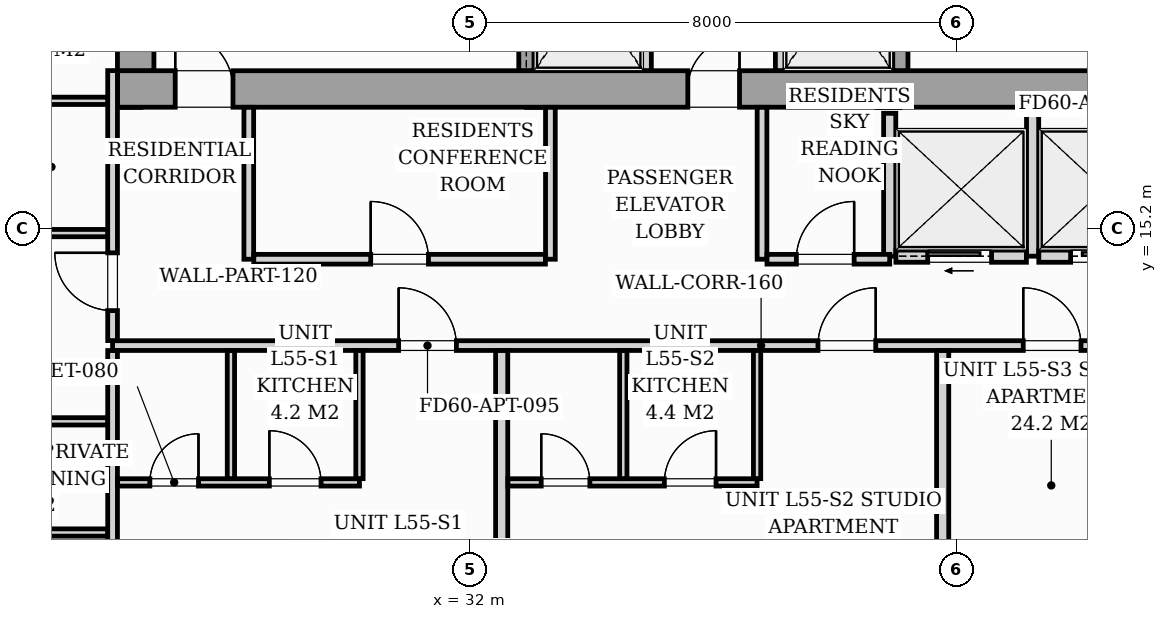
"""IFC4 building model, lengths in metres.
Left out: names, types, materials, properties, quantities, classifications, styles, units other than length and angle.
Written with IfcOpenShell. Run it as: python <this file> out.ifc"""

import sys

from ifc_helpers import new_model, si_unit, direction, frame, frame_2d, origin, origin_2d, place, context, subcontext, project, spatial, rectangle, i_section, extrude, source, transform, mapped, element, fill, save


model = new_model("IFC4")
c1 = context("Model", 3, precision=1e-05, world=origin(), true_north=direction((0.0, 1.0)))
c2 = subcontext(c1, "Body", "Model", "MODEL_VIEW")
j1 = project(units=[si_unit("LENGTHUNIT", "METRE"), si_unit("PLANEANGLEUNIT", "RADIAN")], contexts=[c1])
p1 = place(None, origin())
s1 = spatial("IfcSite", under=j1, at=p1, CompositionType="ELEMENT")
p2 = place(p1, origin())
s2 = spatial("IfcBuilding", under=s1, at=p2, CompositionType="ELEMENT")
p3 = place(p2, frame((0.0, 0.0, 192.2)))
s3 = spatial("IfcBuildingStorey", under=s2, at=p3, CompositionType="ELEMENT", Elevation=192.2)
m1 = source(origin(), c2, "Body", "SweptSolid", [
    extrude(i_section(OverallWidth=0.416, OverallDepth=0.446, WebThickness=0.039, FlangeThickness=0.063, FilletRadius=0.018, at=origin_2d()), origin(), (0.0, 0.0, 1.0), 3.196),
])
for number, where, z_axis, x_axis in (
    (1, (26.4, 17.4, 0.002), (0.0, 0.0, 1.0), (1.0, 0.0, 0.0)),
    (2, (33.12, 17.4, 0.002), (0.0, 0.0, 1.0), (1.0, 0.0, 0.0)),
    (3, (38.88, 17.4, 0.002), (0.0, 0.0, 1.0), (1.0, 0.0, 0.0)),
):
    element("IfcColumn", number, at=place(p3, frame(where, z_axis=z_axis, x_axis=x_axis)), inside=s3, PredefinedType="PILASTER", context=c2, shape_type="MappedRepresentation", body=[
        mapped(m1, transform((0.0, 0.0, 0.0), scale=1.0)),
    ])
p4 = place(p3, frame((26.2, 17.5, 0.0), z_axis=(0.0, 0.0, 1.0), x_axis=(1.0, 0.0, 0.0)))
e4 = element("IfcWall", 4, at=p4, inside=s3, PredefinedType="SHEAR", context=c2, shape_type="SweptSolid", body=[
    extrude(rectangle(XDim=19.6, YDim=0.6, at=frame_2d((9.8, 0.0))), origin(), (0.0, 0.0, 1.0), 3.2),
])
p5 = place(p4, frame((0.95, 0.0, 0.0)))
e5 = element("IfcOpeningElement", 5, at=p5, cuts=e4, PredefinedType="OPENING", context=c2, shape_type="SweptSolid", body=[
    extrude(rectangle(XDim=0.95, YDim=2.06, at=frame_2d((0.475, 1.03))), frame((0.0, 0.31, 0.0), z_axis=(0.0, -1.0, 0.0), x_axis=(1.0, 0.0, 0.0)), (0.0, 0.0, 1.0), 0.62),
])
p6 = place(p4, frame((9.38, 0.0, 0.0)))
e6 = element("IfcOpeningElement", 6, at=p6, cuts=e4, PredefinedType="OPENING", context=c2, shape_type="SweptSolid", body=[
    extrude(rectangle(XDim=0.85, YDim=2.0, at=frame_2d((0.425, 1.0))), frame((0.0, 0.31, 0.0), z_axis=(0.0, -1.0, 0.0), x_axis=(1.0, 0.0, 0.0)), (0.0, 0.0, 1.0), 0.62),
])
p7 = place(p4, frame((17.55, 0.0, 0.0)))
e7 = element("IfcOpeningElement", 7, at=p7, cuts=e4, PredefinedType="OPENING", context=c2, shape_type="SweptSolid", body=[
    extrude(rectangle(XDim=0.95, YDim=2.06, at=frame_2d((0.475, 1.03))), frame((0.0, 0.31, 0.0), z_axis=(0.0, -1.0, 0.0), x_axis=(1.0, 0.0, 0.0)), (0.0, 0.0, 1.0), 0.62),
])
p8 = place(p3, frame((26.5, 17.802, 0.0), z_axis=(0.0, 0.0, 1.0), x_axis=(0.0, 1.0, 0.0)))
e8 = element("IfcWall", 8, at=p8, inside=s3, PredefinedType="SHEAR", context=c2, shape_type="SweptSolid", body=[
    extrude(rectangle(XDim=5.796, YDim=0.6, at=frame_2d((2.898, 0.0))), origin(), (0.0, 0.0, 1.0), 3.2),
])
p9 = place(p3, frame((32.925, 17.802, 0.0), z_axis=(0.0, 0.0, 1.0), x_axis=(0.0, 1.0, 0.0)))
e9 = element("IfcWall", 9, at=p9, inside=s3, PredefinedType="SOLIDWALL", context=c2, shape_type="SweptSolid", body=[
    extrude(rectangle(XDim=2.646, YDim=0.25, at=frame_2d((1.323, 0.0))), origin(), (0.0, 0.0, 1.0), 3.2),
])
p10 = place(p9, frame((0.548, 0.0, 0.0)))
e10 = element("IfcOpeningElement", 10, at=p10, cuts=e9, PredefinedType="OPENING", context=c2, shape_type="SweptSolid", body=[
    extrude(rectangle(XDim=1.1, YDim=2.08, at=frame_2d((0.55, 1.04))), frame((0.0, 0.135, 0.0), z_axis=(0.0, -1.0, 0.0), x_axis=(1.0, 0.0, 0.0)), (0.0, 0.0, 1.0), 0.27),
])
for number, where, z_axis, x_axis in (
    (11, (34.9, 17.802, 0.0), (0.0, 0.0, 1.0), (0.0, 1.0, 0.0)),
    (12, (37.1, 17.802, 0.0), (0.0, 0.0, 1.0), (0.0, 1.0, 0.0)),
):
    element("IfcWall", number, at=place(p3, frame(where, z_axis=z_axis, x_axis=x_axis)), inside=s3, PredefinedType="PARTITIONING", context=c2, shape_type="SweptSolid", body=[
        extrude(rectangle(XDim=2.646, YDim=0.16, at=frame_2d((1.323, 0.0))), origin(), (0.0, 0.0, 1.0), 2.94),
    ])
p11 = place(p3, frame((39.075, 17.802, 0.0), z_axis=(0.0, 0.0, 1.0), x_axis=(0.0, 1.0, 0.0)))
e13 = element("IfcWall", 13, at=p11, inside=s3, PredefinedType="SOLIDWALL", context=c2, shape_type="SweptSolid", body=[
    extrude(rectangle(XDim=2.646, YDim=0.25, at=frame_2d((1.323, 0.0))), origin(), (0.0, 0.0, 1.0), 3.2),
])
p12 = place(p11, frame((0.548, 0.0, 0.0)))
e14 = element("IfcOpeningElement", 14, at=p12, cuts=e13, PredefinedType="OPENING", context=c2, shape_type="SweptSolid", body=[
    extrude(rectangle(XDim=1.1, YDim=2.08, at=frame_2d((0.55, 1.04))), frame((0.0, 0.135, 0.0), z_axis=(0.0, -1.0, 0.0), x_axis=(1.0, 0.0, 0.0)), (0.0, 0.0, 1.0), 0.27),
])
for number, where, z_axis, x_axis in (
    (15, (38.9, 14.75, 0.0), (0.0, 0.0, 1.0), (0.0, 1.0, 0.0)),
    (16, (41.25, 14.75, 0.0), (0.0, 0.0, 1.0), (0.0, 1.0, 0.0)),
):
    element("IfcWall", number, at=place(p3, frame(where, z_axis=z_axis, x_axis=x_axis)), inside=s3, PredefinedType="PARTITIONING", context=c2, shape_type="SweptSolid", body=[
        extrude(rectangle(XDim=2.35, YDim=0.2, at=frame_2d((1.175, 0.0))), origin(), (0.0, 0.0, 1.0), 2.94),
    ])
p13 = place(p3, frame((39.002, 14.75, 0.0), z_axis=(0.0, 0.0, 1.0), x_axis=(1.0, 0.0, 0.0)))
e17 = element("IfcWall", 17, at=p13, inside=s3, PredefinedType="PARTITIONING", context=c2, shape_type="SweptSolid", body=[
    extrude(rectangle(XDim=2.146, YDim=0.2, at=frame_2d((1.073, 0.0))), origin(), (0.0, 0.0, 1.0), 2.94),
])
p14 = place(p13, frame((0.523, 0.0, 0.0)))
e18 = element("IfcOpeningElement", 18, at=p14, cuts=e17, PredefinedType="OPENING", context=c2, shape_type="SweptSolid", body=[
    extrude(rectangle(XDim=1.05, YDim=2.08, at=frame_2d((0.525, 1.04))), frame((0.0, 0.11, 0.0), z_axis=(0.0, -1.0, 0.0), x_axis=(1.0, 0.0, 0.0)), (0.0, 0.0, 1.0), 0.22),
])
p15 = place(p3, frame((41.352, 14.75, 0.0), z_axis=(0.0, 0.0, 1.0), x_axis=(1.0, 0.0, 0.0)))
e19 = element("IfcWall", 19, at=p15, inside=s3, PredefinedType="PARTITIONING", context=c2, shape_type="SweptSolid", body=[
    extrude(rectangle(XDim=2.146, YDim=0.2, at=frame_2d((1.073, 0.0))), origin(), (0.0, 0.0, 1.0), 2.94),
])
p16 = place(p15, frame((0.523, 0.0, 0.0)))
e20 = element("IfcOpeningElement", 20, at=p16, cuts=e19, PredefinedType="OPENING", context=c2, shape_type="SweptSolid", body=[
    extrude(rectangle(XDim=1.05, YDim=2.08, at=frame_2d((0.525, 1.04))), frame((0.0, 0.11, 0.0), z_axis=(0.0, -1.0, 0.0), x_axis=(1.0, 0.0, 0.0)), (0.0, 0.0, 1.0), 0.22),
])
p17 = place(p3, frame((26.12, 13.28, 0.0), z_axis=(0.0, 0.0, 1.0), x_axis=(1.0, 0.0, 0.0)))
e21 = element("IfcWall", 21, at=p17, inside=s3, PredefinedType="PARTITIONING", context=c2, shape_type="SweptSolid", body=[
    extrude(rectangle(XDim=21.33, YDim=0.16, at=frame_2d((10.665, 0.0))), origin(), (0.0, 0.0, 1.0), 2.94),
])
p18 = place(p17, frame((4.704, 0.0, 0.0)))
e22 = element("IfcOpeningElement", 22, at=p18, cuts=e21, PredefinedType="OPENING", context=c2, shape_type="SweptSolid", body=[
    extrude(rectangle(XDim=0.95, YDim=2.06, at=frame_2d((0.475, 1.03))), frame((0.0, 0.09, 0.0), z_axis=(0.0, -1.0, 0.0), x_axis=(1.0, 0.0, 0.0)), (0.0, 0.0, 1.0), 0.18),
])
p19 = place(p17, frame((11.6, 0.0, 0.0)))
e23 = element("IfcOpeningElement", 23, at=p19, cuts=e21, PredefinedType="OPENING", context=c2, shape_type="SweptSolid", body=[
    extrude(rectangle(XDim=0.95, YDim=2.06, at=frame_2d((0.475, 1.03))), frame((0.0, 0.09, 0.0), z_axis=(0.0, -1.0, 0.0), x_axis=(1.0, 0.0, 0.0)), (0.0, 0.0, 1.0), 0.18),
])
p20 = place(p17, frame((14.976, 0.0, 0.0)))
e24 = element("IfcOpeningElement", 24, at=p20, cuts=e21, PredefinedType="OPENING", context=c2, shape_type="SweptSolid", body=[
    extrude(rectangle(XDim=0.95, YDim=2.06, at=frame_2d((0.475, 1.03))), frame((0.0, 0.09, 0.0), z_axis=(0.0, -1.0, 0.0), x_axis=(1.0, 0.0, 0.0)), (0.0, 0.0, 1.0), 0.18),
])
p21 = place(p3, frame((26.12, 7.261, 0.0), z_axis=(0.0, 0.0, 1.0), x_axis=(0.0, 1.0, 0.0)))
e25 = element("IfcWall", 25, at=p21, inside=s3, PredefinedType="PARTITIONING", context=c2, shape_type="SweptSolid", body=[
    extrude(rectangle(XDim=5.937, YDim=0.16, at=frame_2d((2.968, 0.0))), origin(), (0.0, 0.0, 1.0), 2.94),
])
p22 = place(p3, frame((26.12, 13.362, 0.0), z_axis=(0.0, 0.0, 1.0), x_axis=(0.0, 1.0, 0.0)))
e26 = element("IfcWall", 26, at=p22, inside=s3, PredefinedType="PARTITIONING", context=c2, shape_type="SweptSolid", body=[
    extrude(rectangle(XDim=4.44, YDim=0.16, at=frame_2d((2.22, 0.0))), origin(), (0.0, 0.0, 1.0), 2.94),
])
p23 = place(p22, frame((0.493, 0.0, 0.0)))
e27 = element("IfcOpeningElement", 27, at=p23, cuts=e26, PredefinedType="OPENING", context=c2, shape_type="SweptSolid", body=[
    extrude(rectangle(XDim=0.95, YDim=2.06, at=frame_2d((0.475, 1.03))), frame((0.0, 0.09, 0.0), z_axis=(0.0, -1.0, 0.0), x_axis=(1.0, 0.0, 0.0)), (0.0, 0.0, 1.0), 0.18),
])
p24 = place(p3, frame((26.202, 11.03, 0.0), z_axis=(0.0, 0.0, 1.0), x_axis=(1.0, 0.0, 0.0)))
e28 = element("IfcWall", 28, at=p24, inside=s3, PredefinedType="PARTITIONING", context=c2, shape_type="SweptSolid", body=[
    extrude(rectangle(XDim=3.978, YDim=0.12, at=frame_2d((1.989, 0.0))), origin(), (0.0, 0.0, 1.0), 2.94),
])
p25 = place(p24, frame((0.531, 0.0, 0.0)))
e29 = element("IfcOpeningElement", 29, at=p25, cuts=e28, PredefinedType="OPENING", context=c2, shape_type="SweptSolid", body=[
    extrude(rectangle(XDim=0.8, YDim=2.02, at=frame_2d((0.4, 1.01))), frame((0.0, 0.07, 0.0), z_axis=(0.0, -1.0, 0.0), x_axis=(1.0, 0.0, 0.0)), (0.0, 0.0, 1.0), 0.14),
])
p26 = place(p24, frame((2.496, 0.0, 0.0)))
e30 = element("IfcOpeningElement", 30, at=p26, cuts=e28, PredefinedType="OPENING", context=c2, shape_type="SweptSolid", body=[
    extrude(rectangle(XDim=0.85, YDim=2.05, at=frame_2d((0.425, 1.025))), frame((0.0, 0.07, 0.0), z_axis=(0.0, -1.0, 0.0), x_axis=(1.0, 0.0, 0.0)), (0.0, 0.0, 1.0), 0.14),
])
for number, where, z_axis, x_axis in (
    (31, (30.18, 11.092, 0.0), (0.0, 0.0, 1.0), (0.0, 1.0, 0.0)),
    (32, (28.066, 11.092, 0.0), (0.0, 0.0, 1.0), (0.0, 1.0, 0.0)),
):
    element("IfcWall", number, at=place(p3, frame(where, z_axis=z_axis, x_axis=x_axis)), inside=s3, PredefinedType="PARTITIONING", context=c2, shape_type="SweptSolid", body=[
        extrude(rectangle(XDim=2.106, YDim=0.12, at=frame_2d((1.053, 0.0))), origin(), (0.0, 0.0, 1.0), 2.94),
    ])
p27 = place(p3, frame((32.519, 7.877, 0.0), z_axis=(0.0, 0.0, 1.0), x_axis=(0.0, 1.0, 0.0)))
e33 = element("IfcWall", 33, at=p27, inside=s3, PredefinedType="PARTITIONING", context=c2, shape_type="SweptSolid", body=[
    extrude(rectangle(XDim=5.321, YDim=0.2, at=frame_2d((2.66, 0.0))), origin(), (0.0, 0.0, 1.0), 2.94),
])
p28 = place(p3, frame((32.621, 11.03, 0.0), z_axis=(0.0, 0.0, 1.0), x_axis=(1.0, 0.0, 0.0)))
e34 = element("IfcWall", 34, at=p28, inside=s3, PredefinedType="PARTITIONING", context=c2, shape_type="SweptSolid", body=[
    extrude(rectangle(XDim=4.098, YDim=0.12, at=frame_2d((2.049, 0.0))), origin(), (0.0, 0.0, 1.0), 2.94),
])
p29 = place(p28, frame((0.548, 0.0, 0.0)))
e35 = element("IfcOpeningElement", 35, at=p29, cuts=e34, PredefinedType="OPENING", context=c2, shape_type="SweptSolid", body=[
    extrude(rectangle(XDim=0.8, YDim=2.02, at=frame_2d((0.4, 1.01))), frame((0.0, 0.07, 0.0), z_axis=(0.0, -1.0, 0.0), x_axis=(1.0, 0.0, 0.0)), (0.0, 0.0, 1.0), 0.14),
])
p30 = place(p28, frame((2.573, 0.0, 0.0)))
e36 = element("IfcOpeningElement", 36, at=p30, cuts=e34, PredefinedType="OPENING", context=c2, shape_type="SweptSolid", body=[
    extrude(rectangle(XDim=0.85, YDim=2.05, at=frame_2d((0.425, 1.025))), frame((0.0, 0.07, 0.0), z_axis=(0.0, -1.0, 0.0), x_axis=(1.0, 0.0, 0.0)), (0.0, 0.0, 1.0), 0.14),
])
for number, where, z_axis, x_axis in (
    (37, (36.719, 11.092, 0.0), (0.0, 0.0, 1.0), (0.0, 1.0, 0.0)),
    (38, (34.519, 11.092, 0.0), (0.0, 0.0, 1.0), (0.0, 1.0, 0.0)),
):
    element("IfcWall", number, at=place(p3, frame(where, z_axis=z_axis, x_axis=x_axis)), inside=s3, PredefinedType="PARTITIONING", context=c2, shape_type="SweptSolid", body=[
        extrude(rectangle(XDim=2.106, YDim=0.12, at=frame_2d((1.053, 0.0))), origin(), (0.0, 0.0, 1.0), 2.94),
    ])
p31 = place(p3, frame((39.771, 8.393, 0.0), z_axis=(0.0, 0.0, 1.0), x_axis=(0.0, 1.0, 0.0)))
e39 = element("IfcWall", 39, at=p31, inside=s3, PredefinedType="PARTITIONING", context=c2, shape_type="SweptSolid", body=[
    extrude(rectangle(XDim=4.805, YDim=0.2, at=frame_2d((2.403, 0.0))), origin(), (0.0, 0.0, 1.0), 2.94),
])
p32 = place(p3, frame((23.782, 17.305, 0.0), z_axis=(0.0, 0.0, 1.0), x_axis=(1.0, 0.0, 0.0)))
e40 = element("IfcWall", 40, at=p32, inside=s3, PredefinedType="PARTITIONING", context=c2, shape_type="SweptSolid", body=[
    extrude(rectangle(XDim=2.256, YDim=0.12, at=frame_2d((1.128, 0.0))), origin(), (0.0, 0.0, 1.0), 2.281),
])
p33 = place(p3, frame((23.782, 15.13, 0.0), z_axis=(0.0, 0.0, 1.0), x_axis=(1.0, 0.0, 0.0)))
e41 = element("IfcWall", 41, at=p33, inside=s3, PredefinedType="PARTITIONING", context=c2, shape_type="SweptSolid", body=[
    extrude(rectangle(XDim=2.256, YDim=0.12, at=frame_2d((1.128, 0.0))), origin(), (0.0, 0.0, 1.0), 2.94),
])
p34 = place(p3, frame((14.365, 10.206, 0.0), z_axis=(0.0, 0.0, 1.0), x_axis=(1.0, 0.0, 0.0)))
e42 = element("IfcWall", 42, at=p34, inside=s3, PredefinedType="PARTITIONING", context=c2, shape_type="SweptSolid", body=[
    extrude(rectangle(XDim=11.673, YDim=0.12, at=frame_2d((5.837, 0.0))), origin(), (0.0, 0.0, 1.0), 2.94),
])
p35 = place(p34, frame((5.405, 0.0, 0.0)))
e43 = element("IfcOpeningElement", 43, at=p35, cuts=e42, PredefinedType="OPENING", context=c2, shape_type="SweptSolid", body=[
    extrude(rectangle(XDim=0.85, YDim=2.05, at=frame_2d((0.425, 1.025))), frame((0.0, 0.07, 0.0), z_axis=(0.0, -1.0, 0.0), x_axis=(1.0, 0.0, 0.0)), (0.0, 0.0, 1.0), 0.14),
])
p36 = place(p3, frame((14.189, 12.034, 0.0), z_axis=(0.0, 0.0, 1.0), x_axis=(1.0, 0.0, 0.0)))
e44 = element("IfcWall", 44, at=p36, inside=s3, PredefinedType="PARTITIONING", context=c2, shape_type="SweptSolid", body=[
    extrude(rectangle(XDim=11.849, YDim=0.12, at=frame_2d((5.925, 0.0))), origin(), (0.0, 0.0, 1.0), 2.94),
])
p37 = place(p36, frame((5.493, 0.0, 0.0)))
e45 = element("IfcOpeningElement", 45, at=p37, cuts=e44, PredefinedType="OPENING", context=c2, shape_type="SweptSolid", body=[
    extrude(rectangle(XDim=0.85, YDim=2.05, at=frame_2d((0.425, 1.025))), frame((0.0, 0.07, 0.0), z_axis=(0.0, -1.0, 0.0), x_axis=(1.0, 0.0, 0.0)), (0.0, 0.0, 1.0), 0.14),
])
for number, where, z_axis, x_axis in (
    (46, (28.36, 14.7, 0.0), (0.0, 0.0, 1.0), (0.0, 1.0, 0.0)),
    (47, (33.32, 14.7, 0.0), (0.0, 0.0, 1.0), (0.0, 1.0, 0.0)),
):
    element("IfcWall", number, at=place(p3, frame(where, z_axis=z_axis, x_axis=x_axis)), inside=s3, PredefinedType="PARTITIONING", context=c2, shape_type="SweptSolid", body=[
        extrude(rectangle(XDim=2.498, YDim=0.16, at=frame_2d((1.249, 0.0))), origin(), (0.0, 0.0, 1.0), 2.94),
    ])
p38 = place(p3, frame((28.442, 14.7, 0.0), z_axis=(0.0, 0.0, 1.0), x_axis=(1.0, 0.0, 0.0)))
e48 = element("IfcWall", 48, at=p38, inside=s3, PredefinedType="PARTITIONING", context=c2, shape_type="SweptSolid", body=[
    extrude(rectangle(XDim=4.796, YDim=0.16, at=frame_2d((2.398, 0.0))), origin(), (0.0, 0.0, 1.0), 2.94),
])
p39 = place(p38, frame((1.923, 0.0, 0.0)))
e49 = element("IfcOpeningElement", 49, at=p39, cuts=e48, PredefinedType="OPENING", context=c2, shape_type="SweptSolid", body=[
    extrude(rectangle(XDim=0.95, YDim=2.06, at=frame_2d((0.475, 1.03))), frame((0.0, 0.09, 0.0), z_axis=(0.0, -1.0, 0.0), x_axis=(1.0, 0.0, 0.0)), (0.0, 0.0, 1.0), 0.18),
])
p40 = place(p3, frame((36.8, 14.7, 0.0), z_axis=(0.0, 0.0, 1.0), x_axis=(0.0, 1.0, 0.0)))
e50 = element("IfcWall", 50, at=p40, inside=s3, PredefinedType="PARTITIONING", context=c2, shape_type="SweptSolid", body=[
    extrude(rectangle(XDim=2.498, YDim=0.16, at=frame_2d((1.249, 0.0))), origin(), (0.0, 0.0, 1.0), 2.94),
])
p41 = place(p3, frame((36.882, 14.7, 0.0), z_axis=(0.0, 0.0, 1.0), x_axis=(1.0, 0.0, 0.0)))
e51 = element("IfcWall", 51, at=p41, inside=s3, PredefinedType="PARTITIONING", context=c2, shape_type="SweptSolid", body=[
    extrude(rectangle(XDim=2.018, YDim=0.16, at=frame_2d((1.009, 0.0))), origin(), (0.0, 0.0, 1.0), 2.94),
])
p42 = place(p41, frame((0.483, 0.0, 0.0)))
e52 = element("IfcOpeningElement", 52, at=p42, cuts=e51, PredefinedType="OPENING", context=c2, shape_type="SweptSolid", body=[
    extrude(rectangle(XDim=0.95, YDim=2.06, at=frame_2d((0.475, 1.03))), frame((0.0, 0.09, 0.0), z_axis=(0.0, -1.0, 0.0), x_axis=(1.0, 0.0, 0.0)), (0.0, 0.0, 1.0), 0.18),
])
m2 = source(origin(), c2, "Body", "SweptSolid", [
    extrude(rectangle(XDim=0.95, YDim=2.06, at=frame_2d((0.475, 1.03))), frame((0.0, 0.025, 0.0), z_axis=(0.0, -1.0, 0.0), x_axis=(1.0, 0.0, 0.0)), (0.0, 0.0, 1.0), 0.05),
])
p43 = place(p5, origin())
e53 = element("IfcDoor", 53, at=p43, inside=s3, OperationType="SINGLE_SWING_LEFT", PredefinedType="DOOR", context=c2, shape_type="MappedRepresentation", body=[
    mapped(m2, transform((0.0, 0.0, 0.0), scale=1.0)),
])
fill(e5, e53)
m3 = source(origin(), c2, "Body", "SweptSolid", [
    extrude(rectangle(XDim=0.85, YDim=2.0, at=frame_2d((0.425, 1.0))), frame((0.0, 0.025, 0.0), z_axis=(0.0, -1.0, 0.0), x_axis=(1.0, 0.0, 0.0)), (0.0, 0.0, 1.0), 0.05),
])
p44 = place(p6, origin())
e54 = element("IfcDoor", 54, at=p44, inside=s3, OperationType="SINGLE_SWING_RIGHT", PredefinedType="DOOR", context=c2, shape_type="MappedRepresentation", body=[
    mapped(m3, transform((0.0, 0.0, 0.0), scale=1.0)),
])
fill(e6, e54)
m4 = source(origin(), c2, "Body", "SweptSolid", [
    extrude(rectangle(XDim=1.05, YDim=2.08, at=frame_2d((0.525, 1.04))), frame((0.0, 0.025, 0.0), z_axis=(0.0, -1.0, 0.0), x_axis=(1.0, 0.0, 0.0)), (0.0, 0.0, 1.0), 0.05),
])
p45 = place(p14, origin())
e55 = element("IfcDoor", 55, at=p45, inside=s3, OperationType="SLIDING_TO_LEFT", PredefinedType="DOOR", context=c2, shape_type="MappedRepresentation", body=[
    mapped(m4, transform((0.0, 0.0, 0.0), scale=1.0)),
])
fill(e18, e55)
p46 = place(p16, origin())
e56 = element("IfcDoor", 56, at=p46, inside=s3, OperationType="SLIDING_TO_RIGHT", PredefinedType="DOOR", context=c2, shape_type="MappedRepresentation", body=[
    mapped(m4, transform((0.0, 0.0, 0.0), scale=1.0)),
])
fill(e20, e56)
m5 = source(origin(), c2, "Body", "SweptSolid", [
    extrude(rectangle(XDim=0.95, YDim=2.06, at=frame_2d((0.475, 1.03))), frame((0.0, 0.025, 0.0), z_axis=(0.0, -1.0, 0.0), x_axis=(1.0, 0.0, 0.0)), (0.0, 0.0, 1.0), 0.05),
])
p47 = place(p18, origin())
e57 = element("IfcDoor", 57, at=p47, inside=s3, OperationType="SINGLE_SWING_LEFT", PredefinedType="DOOR", context=c2, shape_type="MappedRepresentation", body=[
    mapped(m5, transform((0.0, 0.0, 0.0), scale=1.0)),
])
fill(e22, e57)
m6 = source(origin(), c2, "Body", "SweptSolid", [
    extrude(rectangle(XDim=0.8, YDim=2.02, at=frame_2d((0.4, 1.01))), frame((0.0, 0.025, 0.0), z_axis=(0.0, -1.0, 0.0), x_axis=(1.0, 0.0, 0.0)), (0.0, 0.0, 1.0), 0.05),
])
p48 = place(p25, origin())
e58 = element("IfcDoor", 58, at=p48, inside=s3, OperationType="SINGLE_SWING_RIGHT", PredefinedType="DOOR", context=c2, shape_type="MappedRepresentation", body=[
    mapped(m6, transform((0.0, 0.0, 0.0), scale=1.0)),
])
fill(e29, e58)
m7 = source(origin(), c2, "Body", "SweptSolid", [
    extrude(rectangle(XDim=0.85, YDim=2.05, at=frame_2d((0.425, 1.025))), frame((0.0, 0.025, 0.0), z_axis=(0.0, -1.0, 0.0), x_axis=(1.0, 0.0, 0.0)), (0.0, 0.0, 1.0), 0.05),
])
p49 = place(p26, origin())
e59 = element("IfcDoor", 59, at=p49, inside=s3, OperationType="SINGLE_SWING_LEFT", PredefinedType="DOOR", context=c2, shape_type="MappedRepresentation", body=[
    mapped(m7, transform((0.0, 0.0, 0.0), scale=1.0)),
])
fill(e30, e59)
p50 = place(p19, origin())
e60 = element("IfcDoor", 60, at=p50, inside=s3, OperationType="SINGLE_SWING_RIGHT", PredefinedType="DOOR", context=c2, shape_type="MappedRepresentation", body=[
    mapped(m5, transform((0.0, 0.0, 0.0), scale=1.0)),
])
fill(e23, e60)
p51 = place(p29, origin())
e61 = element("IfcDoor", 61, at=p51, inside=s3, OperationType="SINGLE_SWING_LEFT", PredefinedType="DOOR", context=c2, shape_type="MappedRepresentation", body=[
    mapped(m6, transform((0.0, 0.0, 0.0), scale=1.0)),
])
fill(e35, e61)
p52 = place(p30, origin())
e62 = element("IfcDoor", 62, at=p52, inside=s3, OperationType="SINGLE_SWING_RIGHT", PredefinedType="DOOR", context=c2, shape_type="MappedRepresentation", body=[
    mapped(m7, transform((0.0, 0.0, 0.0), scale=1.0)),
])
fill(e36, e62)
p53 = place(p20, origin())
e63 = element("IfcDoor", 63, at=p53, inside=s3, OperationType="SINGLE_SWING_LEFT", PredefinedType="DOOR", context=c2, shape_type="MappedRepresentation", body=[
    mapped(m5, transform((0.0, 0.0, 0.0), scale=1.0)),
])
fill(e24, e63)
p54 = place(p23, origin())
e64 = element("IfcDoor", 64, at=p54, inside=s3, OperationType="SINGLE_SWING_RIGHT", PredefinedType="DOOR", context=c2, shape_type="MappedRepresentation", body=[
    mapped(m5, transform((0.0, 0.0, 0.0), scale=1.0)),
])
fill(e27, e64)
p55 = place(p39, origin())
e65 = element("IfcDoor", 65, at=p55, inside=s3, OperationType="SINGLE_SWING_LEFT", PredefinedType="DOOR", context=c2, shape_type="MappedRepresentation", body=[
    mapped(m5, transform((0.0, 0.0, 0.0), scale=1.0)),
])
fill(e49, e65)
p56 = place(p42, origin())
e66 = element("IfcDoor", 66, at=p56, inside=s3, OperationType="SINGLE_SWING_RIGHT", PredefinedType="DOOR", context=c2, shape_type="MappedRepresentation", body=[
    mapped(m5, transform((0.0, 0.0, 0.0), scale=1.0)),
])
fill(e52, e66)
save(model, sys.argv[1])
